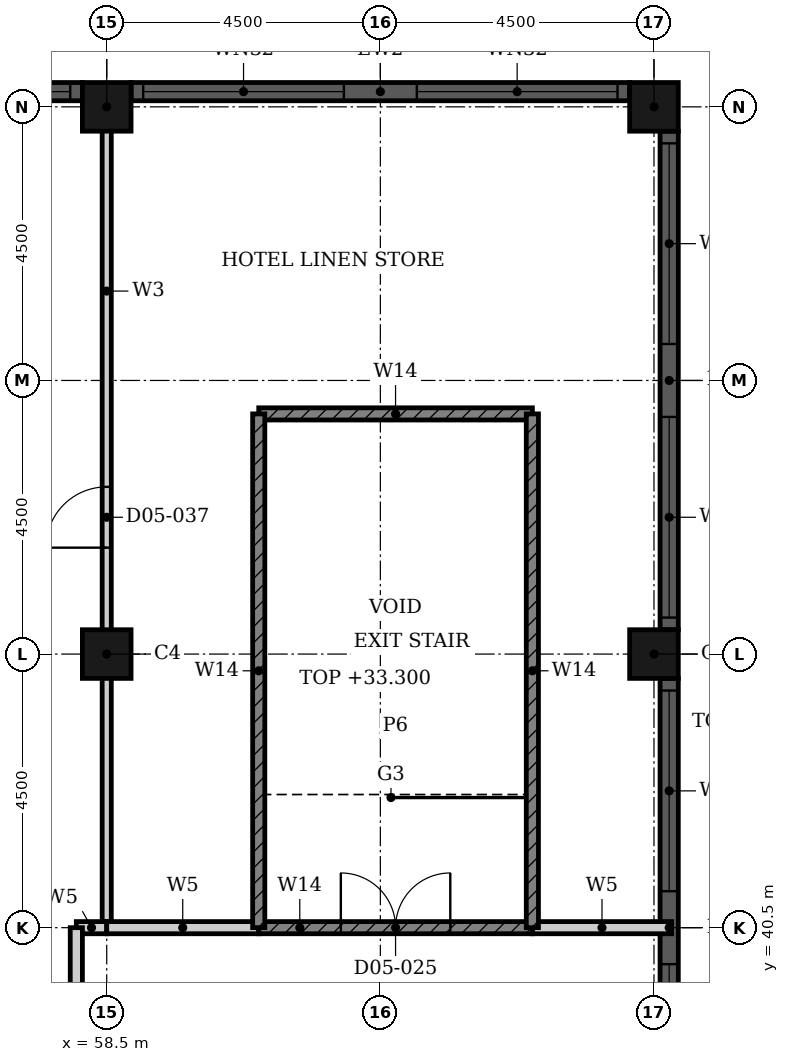
"""IFC4 building model, lengths in metres.
Left out: names, types, materials, properties, quantities, classifications, styles, units other than length and angle.
Written with IfcOpenShell. Run it as: python <this file> out.ifc"""

import sys

from ifc_helpers import new_model, si_unit, direction, frame, frame_2d, origin, origin_2d, place, context, subcontext, project, spatial, rectangle, hollow_rectangle, extrude, element, fill, save


model = new_model("IFC4")
c1 = context("Model", 3, precision=1e-05, world=origin(), true_north=direction((0.0, 1.0)))
c2 = subcontext(c1, "Body", "Model", "MODEL_VIEW")
j1 = project(units=[si_unit("LENGTHUNIT", "METRE"), si_unit("PLANEANGLEUNIT", "RADIAN")], contexts=[c1])
p1 = place(None, origin())
s1 = spatial("IfcSite", under=j1, at=p1, CompositionType="ELEMENT")
p2 = place(p1, origin())
s2 = spatial("IfcBuilding", under=s1, at=p2, CompositionType="ELEMENT")
p3 = place(p2, frame((0.0, 0.0, 28.8)))
s3 = spatial("IfcBuildingStorey", under=s2, at=p3, CompositionType="ELEMENT", Elevation=28.8)
for number, where, z_axis, x_axis in (
    (1, (58.5, 54.0, 0.0), (0.0, 0.0, 1.0), (1.0, 0.0, 0.0)),
    (2, (67.5, 45.0, 0.0), (0.0, 0.0, 1.0), (1.0, 0.0, 0.0)),
    (3, (67.5, 54.0, 0.0), (0.0, 0.0, 1.0), (1.0, 0.0, 0.0)),
    (4, (58.5, 45.0, 0.0), (0.0, 0.0, 1.0), (1.0, 0.0, 0.0)),
):
    element("IfcColumn", number, at=place(p3, frame(where, z_axis=z_axis, x_axis=x_axis)), inside=s3, PredefinedType="COLUMN", context=c2, shape_type="SweptSolid", body=[
        extrude(hollow_rectangle(XDim=0.8, YDim=0.8, WallThickness=0.025, at=origin_2d()), origin(), (0.0, 0.0, 1.0), 4.5),
    ])
p4 = place(p3, frame((67.75, 36.4, 0.0), z_axis=(0.0, 0.0, 1.0), x_axis=(0.0, 1.0, 0.0)))
e5 = element("IfcWall", 5, at=p4, inside=s3, PredefinedType="SOLIDWALL", context=c2, shape_type="SweptSolid", body=[
    extrude(rectangle(XDim=8.2, YDim=0.3, at=frame_2d((4.1, 0.0))), origin(), (0.0, 0.0, 1.0), 4.8),
])
p5 = place(p4, frame((0.2, 0.0, 0.9)))
e6 = element("IfcOpeningElement", 6, at=p5, cuts=e5, PredefinedType="OPENING", context=c2, shape_type="SweptSolid", body=[
    extrude(rectangle(XDim=3.3, YDim=2.9, at=frame_2d((1.65, 1.45))), frame((0.0, 0.16, 0.0), z_axis=(0.0, -1.0, 0.0), x_axis=(1.0, 0.0, 0.0)), (0.0, 0.0, 1.0), 0.32),
])
p6 = place(p4, frame((4.7, 0.0, 0.9)))
e7 = element("IfcOpeningElement", 7, at=p6, cuts=e5, PredefinedType="OPENING", context=c2, shape_type="SweptSolid", body=[
    extrude(rectangle(XDim=3.3, YDim=2.9, at=frame_2d((1.65, 1.45))), frame((0.0, 0.16, 0.0), z_axis=(0.0, -1.0, 0.0), x_axis=(1.0, 0.0, 0.0)), (0.0, 0.0, 1.0), 0.32),
])
p7 = place(p3, frame((67.75, 45.4, 0.0), z_axis=(0.0, 0.0, 1.0), x_axis=(0.0, 1.0, 0.0)))
e8 = element("IfcWall", 8, at=p7, inside=s3, PredefinedType="SOLIDWALL", context=c2, shape_type="SweptSolid", body=[
    extrude(rectangle(XDim=8.2, YDim=0.3, at=frame_2d((4.1, 0.0))), origin(), (0.0, 0.0, 1.0), 4.8),
])
p8 = place(p7, frame((0.2, 0.0, 0.9)))
e9 = element("IfcOpeningElement", 9, at=p8, cuts=e8, PredefinedType="OPENING", context=c2, shape_type="SweptSolid", body=[
    extrude(rectangle(XDim=3.3, YDim=2.9, at=frame_2d((1.65, 1.45))), frame((0.0, 0.16, 0.0), z_axis=(0.0, -1.0, 0.0), x_axis=(1.0, 0.0, 0.0)), (0.0, 0.0, 1.0), 0.32),
])
p9 = place(p7, frame((4.7, 0.0, 0.9)))
e10 = element("IfcOpeningElement", 10, at=p9, cuts=e8, PredefinedType="OPENING", context=c2, shape_type="SweptSolid", body=[
    extrude(rectangle(XDim=3.3, YDim=2.9, at=frame_2d((1.65, 1.45))), frame((0.0, 0.16, 0.0), z_axis=(0.0, -1.0, 0.0), x_axis=(1.0, 0.0, 0.0)), (0.0, 0.0, 1.0), 0.32),
])
p10 = place(p3, frame((67.1, 54.25, 0.0), z_axis=(0.0, 0.0, 1.0), x_axis=(-1.0, 0.0, 0.0)))
e11 = element("IfcWall", 11, at=p10, inside=s3, PredefinedType="SOLIDWALL", context=c2, shape_type="SweptSolid", body=[
    extrude(rectangle(XDim=8.2, YDim=0.3, at=frame_2d((4.1, 0.0))), origin(), (0.0, 0.0, 1.0), 4.8),
])
p11 = place(p10, frame((0.2, 0.0, 0.9)))
e12 = element("IfcOpeningElement", 12, at=p11, cuts=e11, PredefinedType="OPENING", context=c2, shape_type="SweptSolid", body=[
    extrude(rectangle(XDim=3.3, YDim=2.9, at=frame_2d((1.65, 1.45))), frame((0.0, 0.16, 0.0), z_axis=(0.0, -1.0, 0.0), x_axis=(1.0, 0.0, 0.0)), (0.0, 0.0, 1.0), 0.32),
])
p12 = place(p10, frame((4.7, 0.0, 0.9)))
e13 = element("IfcOpeningElement", 13, at=p12, cuts=e11, PredefinedType="OPENING", context=c2, shape_type="SweptSolid", body=[
    extrude(rectangle(XDim=3.3, YDim=2.9, at=frame_2d((1.65, 1.45))), frame((0.0, 0.16, 0.0), z_axis=(0.0, -1.0, 0.0), x_axis=(1.0, 0.0, 0.0)), (0.0, 0.0, 1.0), 0.32),
])
p13 = place(p3, frame((58.1, 54.25, 0.0), z_axis=(0.0, 0.0, 1.0), x_axis=(-1.0, 0.0, 0.0)))
e14 = element("IfcWall", 14, at=p13, inside=s3, PredefinedType="SOLIDWALL", context=c2, shape_type="SweptSolid", body=[
    extrude(rectangle(XDim=8.2, YDim=0.3, at=frame_2d((4.1, 0.0))), origin(), (0.0, 0.0, 1.0), 4.8),
])
p14 = place(p13, frame((0.2, 0.0, 0.9)))
e15 = element("IfcOpeningElement", 15, at=p14, cuts=e14, PredefinedType="OPENING", context=c2, shape_type="SweptSolid", body=[
    extrude(rectangle(XDim=3.3, YDim=2.9, at=frame_2d((1.65, 1.45))), frame((0.0, 0.16, 0.0), z_axis=(0.0, -1.0, 0.0), x_axis=(1.0, 0.0, 0.0)), (0.0, 0.0, 1.0), 0.32),
])
p15 = place(p13, frame((4.7, 0.0, 0.9)))
e16 = element("IfcOpeningElement", 16, at=p15, cuts=e14, PredefinedType="OPENING", context=c2, shape_type="SweptSolid", body=[
    extrude(rectangle(XDim=3.3, YDim=2.9, at=frame_2d((1.65, 1.45))), frame((0.0, 0.16, 0.0), z_axis=(0.0, -1.0, 0.0), x_axis=(1.0, 0.0, 0.0)), (0.0, 0.0, 1.0), 0.32),
])
p16 = place(p3, frame((58.5, 40.5, 0.0), z_axis=(0.0, 0.0, 1.0), x_axis=(0.0, 1.0, 0.0)))
e17 = element("IfcWall", 17, at=p16, inside=s3, PredefinedType="PARTITIONING", context=c2, shape_type="SweptSolid", body=[
    extrude(rectangle(XDim=13.69, YDim=0.15, at=frame_2d((6.845, 0.0))), origin(), (0.0, 0.0, 1.0), 4.5),
])
p17 = place(p16, frame((6.25, 0.0, 0.0)))
e18 = element("IfcOpeningElement", 18, at=p17, cuts=e17, PredefinedType="OPENING", context=c2, shape_type="SweptSolid", body=[
    extrude(rectangle(XDim=1.0, YDim=2.1, at=frame_2d((0.5, 1.05))), frame((0.0, 0.085, 0.0), z_axis=(0.0, -1.0, 0.0), x_axis=(1.0, 0.0, 0.0)), (0.0, 0.0, 1.0), 0.17),
])
p18 = place(p3, frame((58.0, 40.5, 0.0), z_axis=(0.0, 0.0, 1.0), x_axis=(1.0, 0.0, 0.0)))
e19 = element("IfcWall", 19, at=p18, inside=s3, PredefinedType="PARTITIONING", context=c2, shape_type="SweptSolid", body=[
    extrude(rectangle(XDim=0.5, YDim=0.2, at=frame_2d((0.25, 0.0))), origin(), (0.0, 0.0, 1.0), 4.5),
])
p19 = place(p3, frame((58.5, 40.5, 0.0), z_axis=(0.0, 0.0, 1.0), x_axis=(1.0, 0.0, 0.0)))
e20 = element("IfcWall", 20, at=p19, inside=s3, PredefinedType="PARTITIONING", context=c2, shape_type="SweptSolid", body=[
    extrude(rectangle(XDim=2.5, YDim=0.2, at=frame_2d((1.25, 0.0))), origin(), (0.0, 0.0, 1.0), 4.5),
])
p20 = place(p3, frame((65.5, 40.5, 0.0), z_axis=(0.0, 0.0, 1.0), x_axis=(1.0, 0.0, 0.0)))
e21 = element("IfcWall", 21, at=p20, inside=s3, PredefinedType="PARTITIONING", context=c2, shape_type="SweptSolid", body=[
    extrude(rectangle(XDim=2.29, YDim=0.2, at=frame_2d((1.145, 0.0))), origin(), (0.0, 0.0, 1.0), 4.5),
])
p21 = place(p3, frame((58.0, 37.5, 0.0), z_axis=(0.0, 0.0, 1.0), x_axis=(0.0, 1.0, 0.0)))
e22 = element("IfcWall", 22, at=p21, inside=s3, PredefinedType="PARTITIONING", context=c2, shape_type="SweptSolid", body=[
    extrude(rectangle(XDim=3.0, YDim=0.2, at=frame_2d((1.5, 0.0))), origin(), (0.0, 0.0, 1.0), 4.5),
])
p22 = place(p3, frame((61.0, 40.5, 0.0), z_axis=(0.0, 0.0, 1.0), x_axis=(1.0, 0.0, 0.0)))
e23 = element("IfcWall", 23, at=p22, inside=s3, PredefinedType="SHEAR", context=c2, shape_type="SweptSolid", body=[
    extrude(rectangle(XDim=4.5, YDim=0.2, at=frame_2d((2.25, 0.0))), origin(), (0.0, 0.0, 1.0), 4.5),
])
p23 = place(p22, frame((1.35, 0.0, 0.0)))
e24 = element("IfcOpeningElement", 24, at=p23, cuts=e23, PredefinedType="OPENING", context=c2, shape_type="SweptSolid", body=[
    extrude(rectangle(XDim=1.8, YDim=2.1, at=frame_2d((0.9, 1.05))), frame((0.0, 0.11, 0.0), z_axis=(0.0, -1.0, 0.0), x_axis=(1.0, 0.0, 0.0)), (0.0, 0.0, 1.0), 0.22),
])
p24 = place(p3, frame((61.0, 48.95, 0.0), z_axis=(0.0, 0.0, 1.0), x_axis=(1.0, 0.0, 0.0)))
e25 = element("IfcWall", 25, at=p24, inside=s3, PredefinedType="SHEAR", context=c2, shape_type="SweptSolid", body=[
    extrude(rectangle(XDim=4.5, YDim=0.2, at=frame_2d((2.25, 0.0))), origin(), (0.0, 0.0, 1.0), 4.5),
])
for number, where, z_axis, x_axis in (
    (26, (61.0, 40.5, 0.0), (0.0, 0.0, 1.0), (0.0, 1.0, 0.0)),
    (27, (65.5, 40.5, 0.0), (0.0, 0.0, 1.0), (0.0, 1.0, 0.0)),
):
    element("IfcWall", number, at=place(p3, frame(where, z_axis=z_axis, x_axis=x_axis)), inside=s3, PredefinedType="SHEAR", context=c2, shape_type="SweptSolid", body=[
        extrude(rectangle(XDim=8.45, YDim=0.2, at=frame_2d((4.225, 0.0))), origin(), (0.0, 0.0, 1.0), 4.5),
    ])
p25 = place(p5, origin())
e28 = element("IfcWindow", 28, at=p25, inside=s3, PartitioningType="SINGLE_PANEL", PredefinedType="WINDOW", context=c2, shape_type="SweptSolid", body=[
    extrude(rectangle(XDim=3.3, YDim=2.9, at=frame_2d((1.65, 1.45))), frame((0.0, 0.03, 0.0), z_axis=(0.0, -1.0, 0.0), x_axis=(1.0, 0.0, 0.0)), (0.0, 0.0, 1.0), 0.06),
])
fill(e6, e28)
p26 = place(p6, origin())
e29 = element("IfcWindow", 29, at=p26, inside=s3, PartitioningType="SINGLE_PANEL", PredefinedType="WINDOW", context=c2, shape_type="SweptSolid", body=[
    extrude(rectangle(XDim=3.3, YDim=2.9, at=frame_2d((1.65, 1.45))), frame((0.0, 0.03, 0.0), z_axis=(0.0, -1.0, 0.0), x_axis=(1.0, 0.0, 0.0)), (0.0, 0.0, 1.0), 0.06),
])
fill(e7, e29)
p27 = place(p8, origin())
e30 = element("IfcWindow", 30, at=p27, inside=s3, PartitioningType="SINGLE_PANEL", PredefinedType="WINDOW", context=c2, shape_type="SweptSolid", body=[
    extrude(rectangle(XDim=3.3, YDim=2.9, at=frame_2d((1.65, 1.45))), frame((0.0, 0.03, 0.0), z_axis=(0.0, -1.0, 0.0), x_axis=(1.0, 0.0, 0.0)), (0.0, 0.0, 1.0), 0.06),
])
fill(e9, e30)
p28 = place(p9, origin())
e31 = element("IfcWindow", 31, at=p28, inside=s3, PartitioningType="SINGLE_PANEL", PredefinedType="WINDOW", context=c2, shape_type="SweptSolid", body=[
    extrude(rectangle(XDim=3.3, YDim=2.9, at=frame_2d((1.65, 1.45))), frame((0.0, 0.03, 0.0), z_axis=(0.0, -1.0, 0.0), x_axis=(1.0, 0.0, 0.0)), (0.0, 0.0, 1.0), 0.06),
])
fill(e10, e31)
p29 = place(p11, origin())
e32 = element("IfcWindow", 32, at=p29, inside=s3, PartitioningType="SINGLE_PANEL", PredefinedType="WINDOW", context=c2, shape_type="SweptSolid", body=[
    extrude(rectangle(XDim=3.3, YDim=2.9, at=frame_2d((1.65, 1.45))), frame((0.0, 0.03, 0.0), z_axis=(0.0, -1.0, 0.0), x_axis=(1.0, 0.0, 0.0)), (0.0, 0.0, 1.0), 0.06),
])
fill(e12, e32)
p30 = place(p12, origin())
e33 = element("IfcWindow", 33, at=p30, inside=s3, PartitioningType="SINGLE_PANEL", PredefinedType="WINDOW", context=c2, shape_type="SweptSolid", body=[
    extrude(rectangle(XDim=3.3, YDim=2.9, at=frame_2d((1.65, 1.45))), frame((0.0, 0.03, 0.0), z_axis=(0.0, -1.0, 0.0), x_axis=(1.0, 0.0, 0.0)), (0.0, 0.0, 1.0), 0.06),
])
fill(e13, e33)
p31 = place(p14, origin())
e34 = element("IfcWindow", 34, at=p31, inside=s3, PartitioningType="SINGLE_PANEL", PredefinedType="WINDOW", context=c2, shape_type="SweptSolid", body=[
    extrude(rectangle(XDim=3.3, YDim=2.9, at=frame_2d((1.65, 1.45))), frame((0.0, 0.03, 0.0), z_axis=(0.0, -1.0, 0.0), x_axis=(1.0, 0.0, 0.0)), (0.0, 0.0, 1.0), 0.06),
])
fill(e15, e34)
p32 = place(p23, origin())
e35 = element("IfcDoor", 35, at=p32, inside=s3, OperationType="DOUBLE_DOOR_SINGLE_SWING", PredefinedType="DOOR", context=c2, shape_type="SweptSolid", body=[
    extrude(rectangle(XDim=1.8, YDim=2.1, at=frame_2d((0.9, 1.05))), frame((0.0, 0.025, 0.0), z_axis=(0.0, -1.0, 0.0), x_axis=(1.0, 0.0, 0.0)), (0.0, 0.0, 1.0), 0.05),
])
fill(e24, e35)
p33 = place(p17, origin())
e36 = element("IfcDoor", 36, at=p33, inside=s3, OperationType="SINGLE_SWING_LEFT", PredefinedType="DOOR", context=c2, shape_type="SweptSolid", body=[
    extrude(rectangle(XDim=1.0, YDim=2.1, at=frame_2d((0.5, 1.05))), frame((0.0, 0.025, 0.0), z_axis=(0.0, -1.0, 0.0), x_axis=(1.0, 0.0, 0.0)), (0.0, 0.0, 1.0), 0.05),
])
fill(e18, e36)
save(model, sys.argv[1])
